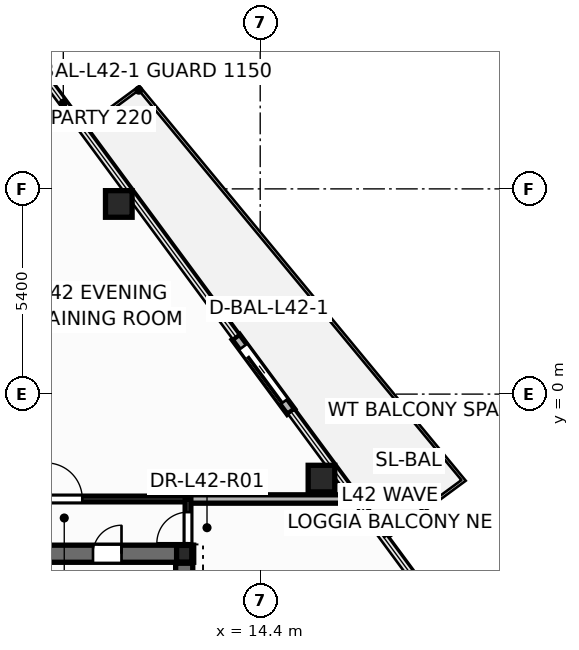
"""IFC4 building model, lengths in metres.
Left out: names, types, materials, properties, quantities, classifications, styles, units other than length and angle.
Written with IfcOpenShell. Run it as: python <this file> out.ifc"""

import sys

from ifc_helpers import new_model, si_unit, direction, frame, frame_2d, origin, origin_2d, place, context, subcontext, project, spatial, rectangle, hollow_circle, i_section, extrude, element, fill, save


model = new_model("IFC4")
c1 = context("Model", 3, precision=1e-05, world=origin(), true_north=direction((0.0, 1.0)))
c2 = subcontext(c1, "Body", "Model", "MODEL_VIEW")
j1 = project(units=[si_unit("LENGTHUNIT", "METRE"), si_unit("PLANEANGLEUNIT", "RADIAN")], contexts=[c1])
p1 = place(None, origin())
s1 = spatial("IfcSite", under=j1, at=p1, CompositionType="ELEMENT")
p2 = place(p1, origin())
s2 = spatial("IfcBuilding", under=s1, at=p2, CompositionType="ELEMENT")
p3 = place(p2, frame((0.0, 0.0, 161.7)))
s3 = spatial("IfcBuildingStorey", under=s2, at=p3, CompositionType="ELEMENT", Elevation=161.7)
for number, where, z_axis, x_axis in (
    (1, (16.012, -2.223, 0.0), (0.0, 0.0, 1.0), (1.0, 0.0, 0.0)),
    (2, (10.679, 5.003, 0.0), (0.0, 0.0, 1.0), (1.0, 0.0, 0.0)),
):
    element("IfcColumn", number, at=place(p3, frame(where, z_axis=z_axis, x_axis=x_axis)), inside=s3, PredefinedType="COLUMN", context=c2, shape_type="SweptSolid", body=[
        extrude(hollow_circle(Radius=0.35, WallThickness=0.03, at=origin_2d()), origin(), (0.0, 0.0, 1.0), 3.6),
    ])
p4 = place(p3, frame((12.4, -4.2, 0.0), z_axis=(0.0, 0.0, 1.0), x_axis=(1.0, 0.0, 0.0)))
e3 = element("IfcColumn", 3, at=p4, inside=s3, PredefinedType="COLUMN", context=c2, shape_type="SweptSolid", body=[
    extrude(i_section(OverallWidth=0.4, OverallDepth=0.44, WebThickness=0.028, FlangeThickness=0.04, at=origin_2d()), origin(), (0.0, 0.0, 1.0), 3.6),
])
p5 = place(p3, frame((15.208, -0.461, -0.015), z_axis=(0.0, 0.0, 1.0), x_axis=(-0.593785976482, 0.804623026102, 0.0)))
e4 = element("IfcWall", 4, at=p5, inside=s3, PredefinedType="STANDARD", context=c2, shape_type="SweptSolid", body=[
    extrude(rectangle(XDim=2.44, YDim=0.24, at=frame_2d((1.22, 0.0))), origin(), (0.0, 0.0, 1.0), 2.807),
])
p6 = place(p5, frame((0.32, 0.0, 0.015)))
e5 = element("IfcOpeningElement", 5, at=p6, cuts=e4, PredefinedType="OPENING", context=c2, shape_type="SweptSolid", body=[
    extrude(rectangle(XDim=1.806, YDim=2.204, at=frame_2d((0.9, 1.102))), frame((0.0, 0.13, 0.0), z_axis=(0.0, -1.0, 0.0), x_axis=(1.0, 0.0, 0.0)), (0.0, 0.0, 1.0), 0.26),
])
p7 = place(p3, frame((-12.65, -4.2, 0.0), z_axis=(0.0, 0.0, 1.0), x_axis=(1.0, 0.0, 0.0)))
e6 = element("IfcWall", 6, at=p7, inside=s3, PredefinedType="SHEAR", context=c2, shape_type="SweptSolid", body=[
    extrude(rectangle(XDim=25.3, YDim=0.45, at=frame_2d((12.65, 0.0))), origin(), (0.0, 0.0, 1.0), 3.6),
])
p8 = place(p7, frame((1.85, 0.0, 0.0)))
e7 = element("IfcOpeningElement", 7, at=p8, cuts=e6, PredefinedType="OPENING", context=c2, shape_type="SweptSolid", body=[
    extrude(rectangle(XDim=0.756, YDim=2.054, at=frame_2d((0.375, 1.027))), frame((0.0, 0.235, 0.0), z_axis=(0.0, -1.0, 0.0), x_axis=(1.0, 0.0, 0.0)), (0.0, 0.0, 1.0), 0.47),
])
p9 = place(p7, frame((22.65, 0.0, 0.0)))
e8 = element("IfcOpeningElement", 8, at=p9, cuts=e6, PredefinedType="OPENING", context=c2, shape_type="SweptSolid", body=[
    extrude(rectangle(XDim=0.756, YDim=2.054, at=frame_2d((0.375, 1.027))), frame((0.0, 0.235, 0.0), z_axis=(0.0, -1.0, 0.0), x_axis=(1.0, 0.0, 0.0)), (0.0, 0.0, 1.0), 0.47),
])
p10 = place(p7, frame((5.85, 0.0, 0.0)))
e9 = element("IfcOpeningElement", 9, at=p10, cuts=e6, PredefinedType="OPENING", context=c2, shape_type="SweptSolid", body=[
    extrude(rectangle(XDim=1.006, YDim=2.104, at=frame_2d((0.5, 1.052))), frame((0.0, 0.235, 0.0), z_axis=(0.0, -1.0, 0.0), x_axis=(1.0, 0.0, 0.0)), (0.0, 0.0, 1.0), 0.47),
])
p11 = place(p7, frame((10.35, 0.0, 0.0)))
e10 = element("IfcOpeningElement", 10, at=p11, cuts=e6, PredefinedType="OPENING", context=c2, shape_type="SweptSolid", body=[
    extrude(rectangle(XDim=1.406, YDim=2.154, at=frame_2d((0.7, 1.077))), frame((0.0, 0.235, 0.0), z_axis=(0.0, -1.0, 0.0), x_axis=(1.0, 0.0, 0.0)), (0.0, 0.0, 1.0), 0.47),
])
p12 = place(p7, frame((18.45, 0.0, 0.0)))
e11 = element("IfcOpeningElement", 11, at=p12, cuts=e6, PredefinedType="OPENING", context=c2, shape_type="SweptSolid", body=[
    extrude(rectangle(XDim=1.006, YDim=2.104, at=frame_2d((0.5, 1.052))), frame((0.0, 0.235, 0.0), z_axis=(0.0, -1.0, 0.0), x_axis=(1.0, 0.0, 0.0)), (0.0, 0.0, 1.0), 0.47),
])
p13 = place(p3, frame((12.4, -13.85, 0.0), z_axis=(0.0, 0.0, 1.0), x_axis=(0.0, 1.0, 0.0)))
e12 = element("IfcWall", 12, at=p13, inside=s3, PredefinedType="SHEAR", context=c2, shape_type="SweptSolid", body=[
    extrude(rectangle(XDim=9.4, YDim=0.45, at=frame_2d((4.7, 0.0))), origin(), (0.0, 0.0, 1.0), 3.6),
])
p14 = place(p3, frame((6.98, -2.76, 0.0), z_axis=(0.0, 0.0, 1.0), x_axis=(1.0, 0.0, 0.0)))
e13 = element("IfcWall", 13, at=p14, inside=s3, PredefinedType="PARTITIONING", context=c2, shape_type="SweptSolid", body=[
    extrude(rectangle(XDim=5.52, YDim=0.15, at=frame_2d((2.76, 0.0))), origin(), (0.0, 0.0, 1.0), 2.325),
])
p15 = place(p14, frame((1.788, 0.0, 0.0)))
e14 = element("IfcOpeningElement", 14, at=p15, cuts=e13, PredefinedType="OPENING", context=c2, shape_type="SweptSolid", body=[
    extrude(rectangle(XDim=0.956, YDim=2.104, at=frame_2d((0.475, 1.052))), frame((0.0, 0.085, 0.0), z_axis=(0.0, -1.0, 0.0), x_axis=(1.0, 0.0, 0.0)), (0.0, 0.0, 1.0), 0.17),
])
p16 = place(p3, frame((12.5, -2.76, 0.0), z_axis=(0.0, 0.0, 1.0), x_axis=(1.0, 0.0, 0.0)))
e15 = element("IfcWall", 15, at=p16, inside=s3, PredefinedType="PARTITIONING", context=c2, shape_type="SweptSolid", body=[
    extrude(rectangle(XDim=4.405, YDim=0.22, at=frame_2d((2.203, 0.0))), origin(), (0.0, 0.0, 1.0), 2.792),
])
p17 = place(p3, frame((12.5, -4.24, 0.0), z_axis=(0.0, 0.0, 1.0), x_axis=(0.0, 1.0, 0.0)))
e16 = element("IfcWall", 16, at=p17, inside=s3, PredefinedType="PARTITIONING", context=c2, shape_type="SweptSolid", body=[
    extrude(rectangle(XDim=1.48, YDim=0.15, at=frame_2d((0.74, 0.0))), origin(), (0.0, 0.0, 1.0), 2.325),
])
p18 = place(p17, frame((0.315, 0.0, 0.0)))
e17 = element("IfcOpeningElement", 17, at=p18, cuts=e16, PredefinedType="OPENING", context=c2, shape_type="SweptSolid", body=[
    extrude(rectangle(XDim=0.826, YDim=2.104, at=frame_2d((0.41, 1.052))), frame((0.0, 0.085, 0.0), z_axis=(0.0, -1.0, 0.0), x_axis=(1.0, 0.0, 0.0)), (0.0, 0.0, 1.0), 0.17),
])
p19 = place(p6, origin())
e18 = element("IfcDoor", 18, at=p19, inside=s3, OperationType="SLIDING_TO_LEFT", PredefinedType="DOOR", context=c2, shape_type="SweptSolid", body=[
    extrude(rectangle(XDim=1.8, YDim=2.2, at=frame_2d((0.9, 1.1))), frame((0.0, 0.025, 0.0), z_axis=(0.0, -1.0, 0.0), x_axis=(1.0, 0.0, 0.0)), (0.0, 0.0, 1.0), 0.05),
])
fill(e5, e18)
p20 = place(p9, origin())
e19 = element("IfcDoor", 19, at=p20, inside=s3, OperationType="SINGLE_SWING_RIGHT", PredefinedType="DOOR", context=c2, shape_type="SweptSolid", body=[
    extrude(rectangle(XDim=0.75, YDim=2.05, at=frame_2d((0.375, 1.025))), frame((0.0, 0.025, 0.0), z_axis=(0.0, -1.0, 0.0), x_axis=(1.0, 0.0, 0.0)), (0.0, 0.0, 1.0), 0.05),
])
fill(e8, e19)
p21 = place(p18, origin())
e20 = element("IfcDoor", 20, at=p21, inside=s3, OperationType="SINGLE_SWING_LEFT", PredefinedType="DOOR", context=c2, shape_type="SweptSolid", body=[
    extrude(rectangle(XDim=0.82, YDim=2.1, at=frame_2d((0.41, 1.05))), frame((0.0, 0.025, 0.0), z_axis=(0.0, -1.0, 0.0), x_axis=(1.0, 0.0, 0.0)), (0.0, 0.0, 1.0), 0.05),
])
fill(e17, e20)
p22 = place(p15, origin())
e21 = element("IfcDoor", 21, at=p22, inside=s3, OperationType="SINGLE_SWING_LEFT", PredefinedType="DOOR", context=c2, shape_type="SweptSolid", body=[
    extrude(rectangle(XDim=0.95, YDim=2.1, at=frame_2d((0.475, 1.05))), frame((0.0, 0.025, 0.0), z_axis=(0.0, -1.0, 0.0), x_axis=(1.0, 0.0, 0.0)), (0.0, 0.0, 1.0), 0.05),
])
fill(e14, e21)
save(model, sys.argv[1])
